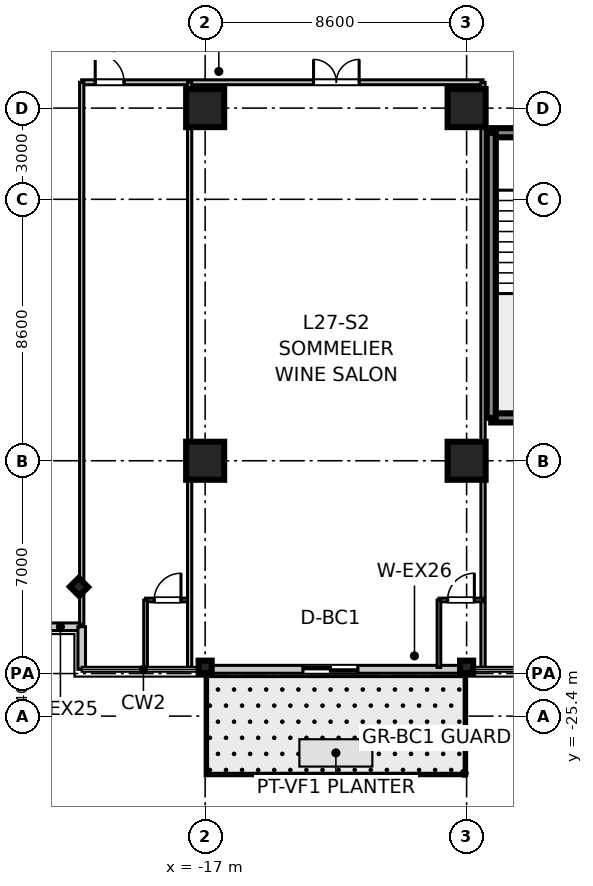
"""IFC4 building model, lengths in metres.
Left out: names, types, materials, properties, quantities, classifications, styles, units other than length and angle.
Written with IfcOpenShell. Run it as: python <this file> out.ifc"""

import sys

from ifc_helpers import new_model, si_unit, direction, frame, frame_2d, origin, origin_2d, place, context, subcontext, project, spatial, rectangle, i_section, extrude, source, transform, mapped, element, fill, save


model = new_model("IFC4")
c1 = context("Model", 3, precision=1e-05, world=origin(), true_north=direction((0.0, 1.0)))
c2 = subcontext(c1, "Body", "Model", "MODEL_VIEW")
j1 = project(units=[si_unit("LENGTHUNIT", "METRE"), si_unit("PLANEANGLEUNIT", "RADIAN")], contexts=[c1])
p1 = place(None, origin())
s1 = spatial("IfcSite", under=j1, at=p1, CompositionType="ELEMENT")
p2 = place(p1, origin())
s2 = spatial("IfcBuilding", under=s1, at=p2, CompositionType="ELEMENT")
p3 = place(p2, frame((0.0, 0.0, 110.2)))
s3 = spatial("IfcBuildingStorey", under=s2, at=p3, CompositionType="ELEMENT", Elevation=110.2)
m1 = source(origin(), c2, "Body", "SweptSolid", [
    extrude(rectangle(XDim=1.25, YDim=1.25, at=origin_2d()), origin(), (0.0, 0.0, 1.0), 3.605),
])
for number, where, z_axis, x_axis in (
    (1, (-17.0, -17.0, 0.0), (0.0, 0.0, 1.0), (1.0, 0.0, 0.0)),
    (2, (-17.0, -5.4, 0.0), (0.0, 0.0, 1.0), (1.0, 0.0, 0.0)),
    (3, (-8.4, -17.0, 0.0), (0.0, 0.0, 1.0), (1.0, 0.0, 0.0)),
    (4, (-8.4, -5.4, 0.0), (0.0, 0.0, 1.0), (1.0, 0.0, 0.0)),
):
    element("IfcColumn", number, at=place(p3, frame(where, z_axis=z_axis, x_axis=x_axis)), inside=s3, PredefinedType="COLUMN", context=c2, shape_type="MappedRepresentation", body=[
        mapped(m1, transform((0.0, 0.0, 0.0), scale=1.0)),
    ])
m2 = source(origin(), c2, "Body", "SweptSolid", [
    extrude(i_section(OverallWidth=0.409, OverallDepth=0.43, WebThickness=0.021, FlangeThickness=0.034, at=origin_2d()), origin(), (0.0, 0.0, 1.0), 3.605),
])
for number, where, z_axis, x_axis in (
    (5, (-17.0, -23.78, 0.0), (0.0, 0.0, 1.0), (0.0, 1.0, 0.0)),
    (6, (-8.4, -23.78, 0.0), (0.0, 0.0, 1.0), (0.0, 1.0, 0.0)),
    (7, (-21.15, -21.15, 0.0), (0.0, 0.0, 1.0), (0.707, 0.707, 0.0)),
):
    element("IfcColumn", number, at=place(p3, frame(where, z_axis=z_axis, x_axis=x_axis)), inside=s3, PredefinedType="COLUMN", context=c2, shape_type="MappedRepresentation", body=[
        mapped(m2, transform((0.0, 0.0, 0.0), scale=1.0)),
    ])
m3 = source(origin(), c2, "Body", "SweptSolid", [
    extrude(rectangle(XDim=3.98, YDim=0.3, at=frame_2d((1.99, 0.0))), origin(), (0.0, 0.0, 1.0), 3.38),
])
p4 = place(p3, frame((-7.59, -15.59, 0.0), z_axis=(0.0, 0.0, 1.0), x_axis=(1.0, 0.0, 0.0)))
e8 = element("IfcWall", 8, at=p4, inside=s3, PredefinedType="SHEAR", context=c2, shape_type="MappedRepresentation", body=[
    mapped(m3, transform((0.0, 0.0, 0.0), scale=1.0)),
])
p5 = place(p3, frame((-7.59, -6.21, 0.0), z_axis=(0.0, 0.0, 1.0), x_axis=(1.0, 0.0, 0.0)))
e9 = element("IfcWall", 9, at=p5, inside=s3, PredefinedType="SHEAR", context=c2, shape_type="MappedRepresentation", body=[
    mapped(m3, transform((0.0, 0.0, 0.0), scale=1.0)),
])
p6 = place(p5, frame((1.44, 0.0, 0.0)))
e10 = element("IfcOpeningElement", 10, at=p6, cuts=e9, PredefinedType="OPENING", context=c2, shape_type="SweptSolid", body=[
    extrude(rectangle(XDim=1.1, YDim=2.15, at=frame_2d((0.55, 1.075))), frame((0.0, 0.16, 0.0), z_axis=(0.0, -1.0, 0.0), x_axis=(1.0, 0.0, 0.0)), (0.0, 0.0, 1.0), 0.32),
])
m4 = source(origin(), c2, "Body", "SweptSolid", [
    extrude(rectangle(XDim=9.38, YDim=0.3, at=frame_2d((4.69, 0.0))), origin(), (0.0, 0.0, 1.0), 3.38),
])
p7 = place(p3, frame((-7.59, -15.59, 0.0), z_axis=(0.0, 0.0, 1.0), x_axis=(0.0, 1.0, 0.0)))
e11 = element("IfcWall", 11, at=p7, inside=s3, PredefinedType="SHEAR", context=c2, shape_type="MappedRepresentation", body=[
    mapped(m4, transform((0.0, 0.0, 0.0), scale=1.0)),
])
m5 = source(origin(), c2, "Body", "SweptSolid", [
    extrude(rectangle(XDim=1.4, YDim=0.25, at=frame_2d((0.7, 0.0))), origin(), (0.0, 0.0, 1.0), 3.38),
])
p8 = place(p3, frame((-22.46, -22.46, 0.0), z_axis=(0.0, 0.0, 1.0), x_axis=(1.0, 0.0, 0.0)))
e12 = element("IfcWall", 12, at=p8, inside=s3, PredefinedType="STANDARD", context=c2, shape_type="MappedRepresentation", body=[
    mapped(m5, transform((0.0, 0.0, 0.0), scale=1.0)),
])
m6 = source(origin(), c2, "Body", "SweptSolid", [
    extrude(rectangle(XDim=1.4, YDim=0.25, at=frame_2d((0.7, 0.0))), origin(), (0.0, 0.0, 1.0), 3.38),
])
p9 = place(p3, frame((-21.06, -23.86, 0.0), z_axis=(0.0, 0.0, 1.0), x_axis=(0.0, 1.0, 0.0)))
e13 = element("IfcWall", 13, at=p9, inside=s3, PredefinedType="STANDARD", context=c2, shape_type="MappedRepresentation", body=[
    mapped(m6, transform((0.0, 0.0, 0.0), scale=1.0)),
])
m7 = source(origin(), c2, "Body", "SweptSolid", [
    extrude(rectangle(XDim=8.6, YDim=0.26, at=frame_2d((4.3, 0.0))), origin(), (0.0, 0.0, 1.0), 2.86),
])
p10 = place(p3, frame((-17.0, -23.86, 0.0), z_axis=(0.0, 0.0, 1.0), x_axis=(1.0, 0.0, 0.0)))
e14 = element("IfcWall", 14, at=p10, inside=s3, PredefinedType="STANDARD", context=c2, shape_type="MappedRepresentation", body=[
    mapped(m7, transform((0.0, 0.0, 0.0), scale=1.0)),
])
p11 = place(p10, frame((3.22, 0.0, 0.0)))
e15 = element("IfcOpeningElement", 15, at=p11, cuts=e14, PredefinedType="OPENING", context=c2, shape_type="SweptSolid", body=[
    extrude(rectangle(XDim=1.8, YDim=2.25, at=frame_2d((0.9, 1.125))), frame((0.0, 0.14, 0.0), z_axis=(0.0, -1.0, 0.0), x_axis=(1.0, 0.0, 0.0)), (0.0, 0.0, 1.0), 0.28),
])
m8 = source(origin(), c2, "Body", "SweptSolid", [
    extrude(rectangle(XDim=13.2, YDim=0.16, at=frame_2d((6.6, 0.0))), origin(), (0.0, 0.0, 1.0), 2.72),
])
p12 = place(p3, frame((-21.06, -4.55, 0.0), z_axis=(0.0, 0.0, 1.0), x_axis=(1.0, 0.0, 0.0)))
e16 = element("IfcWall", 16, at=p12, inside=s3, PredefinedType="PARTITIONING", context=c2, shape_type="MappedRepresentation", body=[
    mapped(m8, transform((0.0, 0.0, 0.0), scale=1.0)),
])
p13 = place(p12, frame((0.444, 0.0, 0.0)))
e17 = element("IfcOpeningElement", 17, at=p13, cuts=e16, PredefinedType="OPENING", context=c2, shape_type="SweptSolid", body=[
    extrude(rectangle(XDim=0.95, YDim=2.1, at=frame_2d((0.475, 1.05))), frame((0.0, 0.09, 0.0), z_axis=(0.0, -1.0, 0.0), x_axis=(1.0, 0.0, 0.0)), (0.0, 0.0, 1.0), 0.18),
])
p14 = place(p12, frame((7.625, 0.0, 0.0)))
e18 = element("IfcOpeningElement", 18, at=p14, cuts=e16, PredefinedType="OPENING", context=c2, shape_type="SweptSolid", body=[
    extrude(rectangle(XDim=1.5, YDim=2.15, at=frame_2d((0.75, 1.075))), frame((0.0, 0.09, 0.0), z_axis=(0.0, -1.0, 0.0), x_axis=(1.0, 0.0, 0.0)), (0.0, 0.0, 1.0), 0.18),
])
m9 = source(origin(), c2, "Body", "SweptSolid", [
    extrude(rectangle(XDim=17.83, YDim=0.14, at=frame_2d((8.915, 0.0))), origin(), (0.0, 0.0, 1.0), 2.72),
])
p15 = place(p3, frame((-21.06, -22.38, 0.0), z_axis=(0.0, 0.0, 1.0), x_axis=(0.0, 1.0, 0.0)))
e19 = element("IfcWall", 19, at=p15, inside=s3, PredefinedType="PARTITIONING", context=c2, shape_type="MappedRepresentation", body=[
    mapped(m9, transform((0.0, 0.0, 0.0), scale=1.0)),
])
m10 = source(origin(), c2, "Body", "SweptSolid", [
    extrude(rectangle(XDim=19.25, YDim=0.14, at=frame_2d((9.625, 0.0))), origin(), (0.0, 0.0, 1.0), 2.72),
])
p16 = place(p3, frame((-7.86, -23.8, 0.0), z_axis=(0.0, 0.0, 1.0), x_axis=(0.0, 1.0, 0.0)))
e20 = element("IfcWall", 20, at=p16, inside=s3, PredefinedType="PARTITIONING", context=c2, shape_type="MappedRepresentation", body=[
    mapped(m10, transform((0.0, 0.0, 0.0), scale=1.0)),
])
m11 = source(origin(), c2, "Body", "SweptSolid", [
    extrude(rectangle(XDim=1.45, YDim=0.12, at=frame_2d((0.725, 0.0))), origin(), (0.0, 0.0, 1.0), 2.72),
])
p17 = place(p3, frame((-18.96, -21.58, 0.0), z_axis=(0.0, 0.0, 1.0), x_axis=(1.0, 0.0, 0.0)))
e21 = element("IfcWall", 21, at=p17, inside=s3, PredefinedType="PARTITIONING", context=c2, shape_type="MappedRepresentation", body=[
    mapped(m11, transform((0.0, 0.0, 0.0), scale=1.0)),
])
p18 = place(p17, frame((0.285, 0.0, 0.0)))
e22 = element("IfcOpeningElement", 22, at=p18, cuts=e21, PredefinedType="OPENING", context=c2, shape_type="SweptSolid", body=[
    extrude(rectangle(XDim=0.88, YDim=2.1, at=frame_2d((0.44, 1.05))), frame((0.0, 0.07, 0.0), z_axis=(0.0, -1.0, 0.0), x_axis=(1.0, 0.0, 0.0)), (0.0, 0.0, 1.0), 0.14),
])
m12 = source(origin(), c2, "Body", "SweptSolid", [
    extrude(rectangle(XDim=2.22, YDim=0.12, at=frame_2d((1.11, 0.0))), origin(), (0.0, 0.0, 1.0), 2.72),
])
p19 = place(p3, frame((-18.96, -23.8, 0.0), z_axis=(0.0, 0.0, 1.0), x_axis=(0.0, 1.0, 0.0)))
e23 = element("IfcWall", 23, at=p19, inside=s3, PredefinedType="PARTITIONING", context=c2, shape_type="MappedRepresentation", body=[
    mapped(m12, transform((0.0, 0.0, 0.0), scale=1.0)),
])
p20 = place(p3, frame((-17.51, -23.8, 0.0), z_axis=(0.0, 0.0, 1.0), x_axis=(0.0, 1.0, 0.0)))
e24 = element("IfcWall", 24, at=p20, inside=s3, PredefinedType="PARTITIONING", context=c2, shape_type="MappedRepresentation", body=[
    mapped(m10, transform((0.0, 0.0, 0.0), scale=1.0)),
])
p21 = place(p3, frame((-9.31, -21.58, 0.0), z_axis=(0.0, 0.0, 1.0), x_axis=(1.0, 0.0, 0.0)))
e25 = element("IfcWall", 25, at=p21, inside=s3, PredefinedType="PARTITIONING", context=c2, shape_type="MappedRepresentation", body=[
    mapped(m11, transform((0.0, 0.0, 0.0), scale=1.0)),
])
p22 = place(p21, frame((0.285, 0.0, 0.0)))
e26 = element("IfcOpeningElement", 26, at=p22, cuts=e25, PredefinedType="OPENING", context=c2, shape_type="SweptSolid", body=[
    extrude(rectangle(XDim=0.88, YDim=2.1, at=frame_2d((0.44, 1.05))), frame((0.0, 0.07, 0.0), z_axis=(0.0, -1.0, 0.0), x_axis=(1.0, 0.0, 0.0)), (0.0, 0.0, 1.0), 0.14),
])
p23 = place(p3, frame((-9.31, -23.8, 0.0), z_axis=(0.0, 0.0, 1.0), x_axis=(0.0, 1.0, 0.0)))
e27 = element("IfcWall", 27, at=p23, inside=s3, PredefinedType="PARTITIONING", context=c2, shape_type="MappedRepresentation", body=[
    mapped(m12, transform((0.0, 0.0, 0.0), scale=1.0)),
])
m13 = source(origin(), c2, "Body", "SweptSolid", [
    extrude(rectangle(XDim=0.88, YDim=2.1, at=frame_2d((0.44, 1.05))), frame((0.0, 0.025, 0.0), z_axis=(0.0, -1.0, 0.0), x_axis=(1.0, 0.0, 0.0)), (0.0, 0.0, 1.0), 0.05),
])
p24 = place(p18, frame((0.88, 0.0, 0.0), z_axis=(0.0, 0.0, 1.0), x_axis=(-1.0, 0.0, 0.0)))
e28 = element("IfcDoor", 28, at=p24, inside=s3, OperationType="SINGLE_SWING_RIGHT", PredefinedType="DOOR", context=c2, shape_type="MappedRepresentation", body=[
    mapped(m13, transform((0.0, 0.0, 0.0), scale=1.0)),
])
fill(e22, e28)
m14 = source(origin(), c2, "Body", "SweptSolid", [
    extrude(rectangle(XDim=0.95, YDim=2.1, at=frame_2d((0.475, 1.05))), frame((0.0, 0.025, 0.0), z_axis=(0.0, -1.0, 0.0), x_axis=(1.0, 0.0, 0.0)), (0.0, 0.0, 1.0), 0.05),
])
p25 = place(p13, frame((0.95, 0.0, 0.0), z_axis=(0.0, 0.0, 1.0), x_axis=(-1.0, 0.0, 0.0)))
e29 = element("IfcDoor", 29, at=p25, inside=s3, OperationType="SINGLE_SWING_LEFT", PredefinedType="DOOR", context=c2, shape_type="MappedRepresentation", body=[
    mapped(m14, transform((0.0, 0.0, 0.0), scale=1.0)),
])
fill(e17, e29)
p26 = place(p22, frame((0.88, 0.0, 0.0), z_axis=(0.0, 0.0, 1.0), x_axis=(-1.0, 0.0, 0.0)))
e30 = element("IfcDoor", 30, at=p26, inside=s3, OperationType="SINGLE_SWING_RIGHT", PredefinedType="DOOR", context=c2, shape_type="MappedRepresentation", body=[
    mapped(m13, transform((0.0, 0.0, 0.0), scale=1.0)),
])
fill(e26, e30)
m15 = source(origin(), c2, "Body", "SweptSolid", [
    extrude(rectangle(XDim=1.5, YDim=2.15, at=frame_2d((0.75, 1.075))), frame((0.0, 0.025, 0.0), z_axis=(0.0, -1.0, 0.0), x_axis=(1.0, 0.0, 0.0)), (0.0, 0.0, 1.0), 0.05),
])
p27 = place(p14, frame((1.5, 0.0, 0.0), z_axis=(0.0, 0.0, 1.0), x_axis=(-1.0, 0.0, 0.0)))
e31 = element("IfcDoor", 31, at=p27, inside=s3, OperationType="DOUBLE_DOOR_SINGLE_SWING", PredefinedType="DOOR", context=c2, shape_type="MappedRepresentation", body=[
    mapped(m15, transform((0.0, 0.0, 0.0), scale=1.0)),
])
fill(e18, e31)
m16 = source(origin(), c2, "Body", "SweptSolid", [
    extrude(rectangle(XDim=1.8, YDim=2.25, at=frame_2d((0.9, 1.125))), frame((0.0, 0.025, 0.0), z_axis=(0.0, -1.0, 0.0), x_axis=(1.0, 0.0, 0.0)), (0.0, 0.0, 1.0), 0.05),
])
p28 = place(p11, frame((1.8, 0.0, 0.0), z_axis=(0.0, 0.0, 1.0), x_axis=(-1.0, 0.0, 0.0)))
e32 = element("IfcDoor", 32, at=p28, inside=s3, OperationType="DOUBLE_DOOR_SLIDING", PredefinedType="DOOR", context=c2, shape_type="MappedRepresentation", body=[
    mapped(m16, transform((0.0, 0.0, 0.0), scale=1.0)),
])
fill(e15, e32)
save(model, sys.argv[1])
